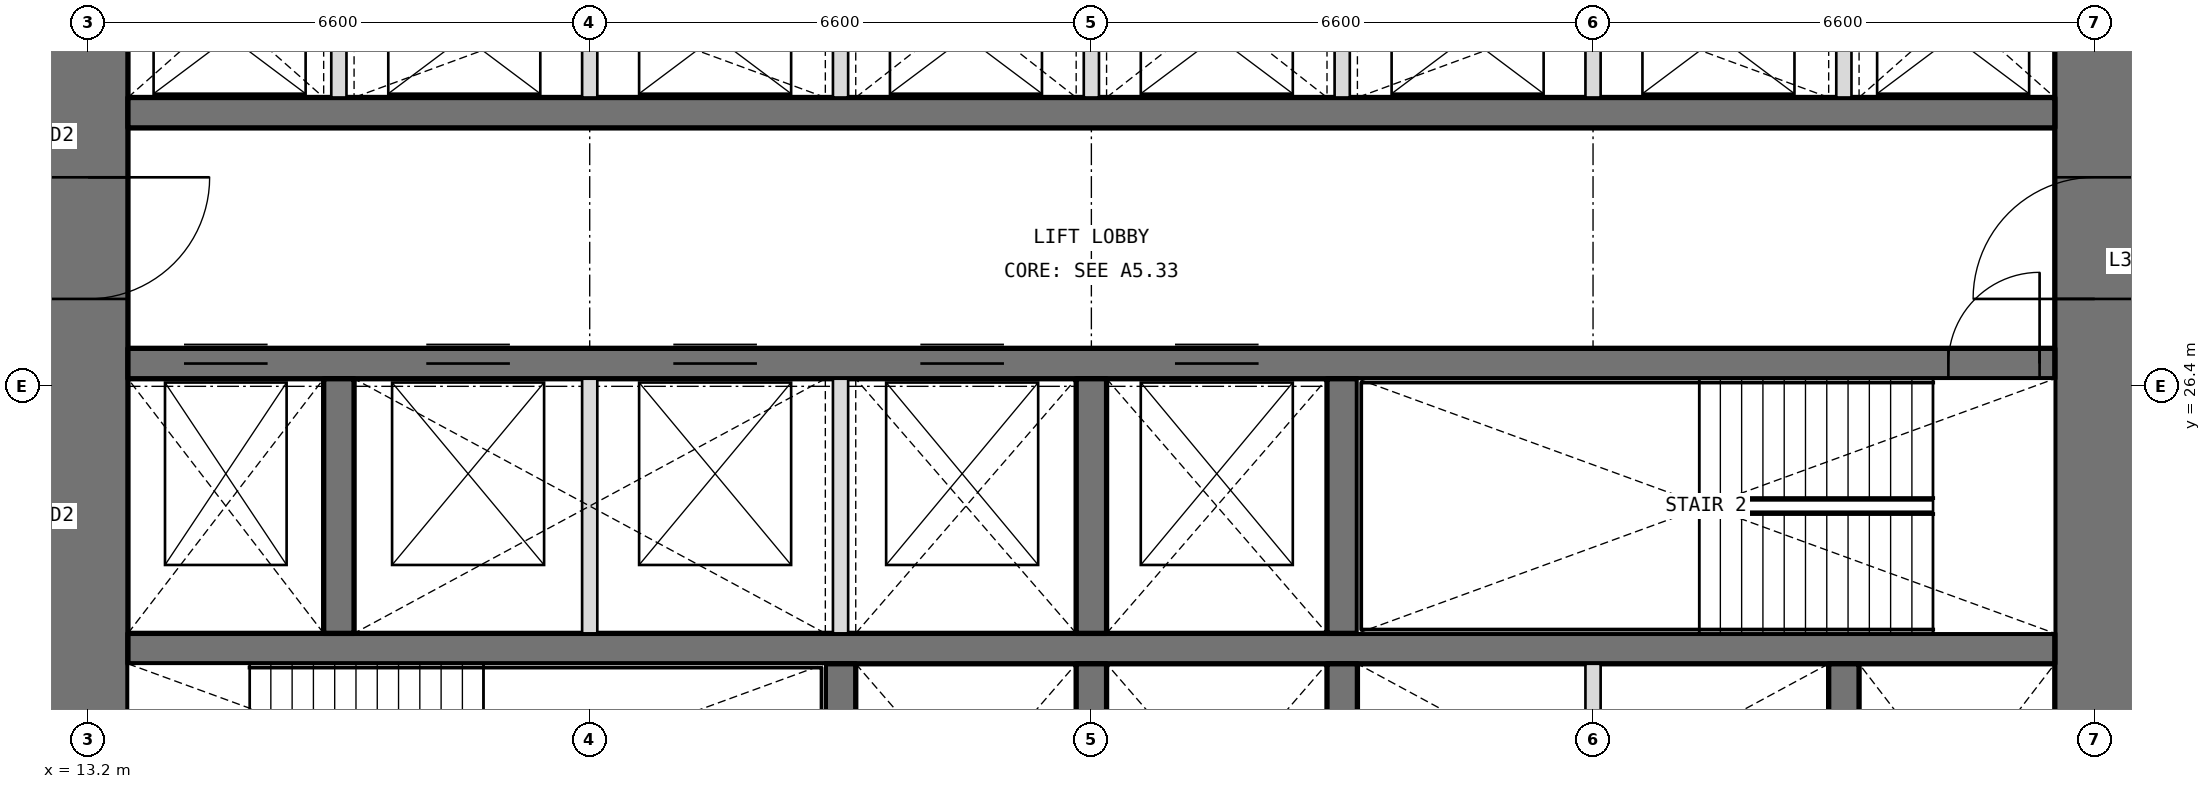
"""IFC4 building model, lengths in metres.
Left out: names, types, materials, properties, quantities, classifications, styles, units other than length and angle.
Written with IfcOpenShell. Run it as: python <this file> out.ifc"""

import sys

from ifc_helpers import new_model, si_unit, direction, frame, frame_2d, origin, place, context, subcontext, project, spatial, rectangle, extrude, element, fill, save


model = new_model("IFC4")
c1 = context("Model", 3, precision=1e-05, world=origin(), true_north=direction((0.0, 1.0)))
c2 = subcontext(c1, "Body", "Model", "MODEL_VIEW")
j1 = project(units=[si_unit("LENGTHUNIT", "METRE"), si_unit("PLANEANGLEUNIT", "RADIAN")], contexts=[c1])
p1 = place(None, origin())
s1 = spatial("IfcSite", under=j1, at=p1, CompositionType="ELEMENT")
p2 = place(p1, origin())
s2 = spatial("IfcBuilding", under=s1, at=p2, CompositionType="ELEMENT")
p3 = place(p2, frame((0.0, 0.0, 136.8)))
s3 = spatial("IfcBuildingStorey", under=s2, at=p3, CompositionType="ELEMENT", Elevation=136.8)
p4 = place(p3, frame((39.6, 13.725, 0.0), z_axis=(0.0, 0.0, 1.0), x_axis=(0.0, 1.0, 0.0)))
e1 = element("IfcWall", 1, at=p4, inside=s3, PredefinedType="SHEAR", context=c2, shape_type="SweptSolid", body=[
    extrude(rectangle(XDim=18.75, YDim=1.05, at=frame_2d((9.375, 0.0))), origin(), (0.0, 0.0, 1.0), 4.2),
])
p5 = place(p4, frame((3.025, 0.0, 0.0)))
e2 = element("IfcOpeningElement", 2, at=p5, cuts=e1, PredefinedType="OPENING", context=c2, shape_type="SweptSolid", body=[
    extrude(rectangle(XDim=1.6, YDim=2.1, at=frame_2d((0.8, 1.05))), frame((0.0, 0.535, 0.0), z_axis=(0.0, -1.0, 0.0), x_axis=(1.0, 0.0, 0.0)), (0.0, 0.0, 1.0), 1.07),
])
p6 = place(p4, frame((13.825, 0.0, 0.0)))
e3 = element("IfcOpeningElement", 3, at=p6, cuts=e1, PredefinedType="OPENING", context=c2, shape_type="SweptSolid", body=[
    extrude(rectangle(XDim=1.6, YDim=2.1, at=frame_2d((0.8, 1.05))), frame((0.0, 0.535, 0.0), z_axis=(0.0, -1.0, 0.0), x_axis=(1.0, 0.0, 0.0)), (0.0, 0.0, 1.0), 1.07),
])
p7 = place(p3, frame((13.2, 32.475, 0.0), z_axis=(0.0, 0.0, 1.0), x_axis=(0.0, -1.0, 0.0)))
e4 = element("IfcWall", 4, at=p7, inside=s3, PredefinedType="SHEAR", context=c2, shape_type="SweptSolid", body=[
    extrude(rectangle(XDim=18.75, YDim=1.05, at=frame_2d((9.375, 0.0))), origin(), (0.0, 0.0, 1.0), 4.2),
])
p8 = place(p7, frame((14.125, 0.0, 0.0)))
e5 = element("IfcOpeningElement", 5, at=p8, cuts=e4, PredefinedType="OPENING", context=c2, shape_type="SweptSolid", body=[
    extrude(rectangle(XDim=1.6, YDim=2.1, at=frame_2d((0.8, 1.05))), frame((0.0, 0.535, 0.0), z_axis=(0.0, -1.0, 0.0), x_axis=(1.0, 0.0, 0.0)), (0.0, 0.0, 1.0), 1.07),
])
p9 = place(p7, frame((3.325, 0.0, 0.0)))
e6 = element("IfcOpeningElement", 6, at=p9, cuts=e4, PredefinedType="OPENING", context=c2, shape_type="SweptSolid", body=[
    extrude(rectangle(XDim=1.6, YDim=2.1, at=frame_2d((0.8, 1.05))), frame((0.0, 0.535, 0.0), z_axis=(0.0, -1.0, 0.0), x_axis=(1.0, 0.0, 0.0)), (0.0, 0.0, 1.0), 1.07),
])
p10 = place(p3, frame((13.725, 22.95, 0.0), z_axis=(0.0, 0.0, 1.0), x_axis=(1.0, 0.0, 0.0)))
e7 = element("IfcWall", 7, at=p10, inside=s3, PredefinedType="SHEAR", context=c2, shape_type="SweptSolid", body=[
    extrude(rectangle(XDim=25.35, YDim=0.4, at=frame_2d((12.675, 0.0))), origin(), (0.0, 0.0, 1.0), 4.2),
])
p11 = place(p3, frame((13.725, 26.7, 0.0), z_axis=(0.0, 0.0, 1.0), x_axis=(1.0, 0.0, 0.0)))
e8 = element("IfcWall", 8, at=p11, inside=s3, PredefinedType="SHEAR", context=c2, shape_type="SweptSolid", body=[
    extrude(rectangle(XDim=25.35, YDim=0.4, at=frame_2d((12.675, 0.0))), origin(), (0.0, 0.0, 1.0), 4.2),
])
p12 = place(p11, frame((23.95, 0.0, 0.0)))
e9 = element("IfcOpeningElement", 9, at=p12, cuts=e8, PredefinedType="OPENING", context=c2, shape_type="SweptSolid", body=[
    extrude(rectangle(XDim=1.2, YDim=2.1, at=frame_2d((0.6, 1.05))), frame((0.0, 0.21, 0.0), z_axis=(0.0, -1.0, 0.0), x_axis=(1.0, 0.0, 0.0)), (0.0, 0.0, 1.0), 0.42),
])
p13 = place(p11, frame((0.738, 0.0, 0.0)))
e10 = element("IfcOpeningElement", 10, at=p13, cuts=e8, PredefinedType="OPENING", context=c2, shape_type="SweptSolid", body=[
    extrude(rectangle(XDim=1.1, YDim=2.1, at=frame_2d((0.55, 1.05))), frame((0.0, 0.21, 0.0), z_axis=(0.0, -1.0, 0.0), x_axis=(1.0, 0.0, 0.0)), (0.0, 0.0, 1.0), 0.42),
])
p14 = place(p11, frame((3.925, 0.0, 0.0)))
e11 = element("IfcOpeningElement", 11, at=p14, cuts=e8, PredefinedType="OPENING", context=c2, shape_type="SweptSolid", body=[
    extrude(rectangle(XDim=1.1, YDim=2.1, at=frame_2d((0.55, 1.05))), frame((0.0, 0.21, 0.0), z_axis=(0.0, -1.0, 0.0), x_axis=(1.0, 0.0, 0.0)), (0.0, 0.0, 1.0), 0.42),
])
p15 = place(p11, frame((7.175, 0.0, 0.0)))
e12 = element("IfcOpeningElement", 12, at=p15, cuts=e8, PredefinedType="OPENING", context=c2, shape_type="SweptSolid", body=[
    extrude(rectangle(XDim=1.1, YDim=2.1, at=frame_2d((0.55, 1.05))), frame((0.0, 0.21, 0.0), z_axis=(0.0, -1.0, 0.0), x_axis=(1.0, 0.0, 0.0)), (0.0, 0.0, 1.0), 0.42),
])
p16 = place(p11, frame((10.425, 0.0, 0.0)))
e13 = element("IfcOpeningElement", 13, at=p16, cuts=e8, PredefinedType="OPENING", context=c2, shape_type="SweptSolid", body=[
    extrude(rectangle(XDim=1.1, YDim=2.1, at=frame_2d((0.55, 1.05))), frame((0.0, 0.21, 0.0), z_axis=(0.0, -1.0, 0.0), x_axis=(1.0, 0.0, 0.0)), (0.0, 0.0, 1.0), 0.42),
])
p17 = place(p11, frame((13.775, 0.0, 0.0)))
e14 = element("IfcOpeningElement", 14, at=p17, cuts=e8, PredefinedType="OPENING", context=c2, shape_type="SweptSolid", body=[
    extrude(rectangle(XDim=1.1, YDim=2.1, at=frame_2d((0.55, 1.05))), frame((0.0, 0.21, 0.0), z_axis=(0.0, -1.0, 0.0), x_axis=(1.0, 0.0, 0.0)), (0.0, 0.0, 1.0), 0.42),
])
p18 = place(p3, frame((13.725, 30.0, 0.0), z_axis=(0.0, 0.0, 1.0), x_axis=(1.0, 0.0, 0.0)))
e15 = element("IfcWall", 15, at=p18, inside=s3, PredefinedType="SHEAR", context=c2, shape_type="SweptSolid", body=[
    extrude(rectangle(XDim=25.35, YDim=0.4, at=frame_2d((12.675, 0.0))), origin(), (0.0, 0.0, 1.0), 4.2),
])
for number, where, z_axis, x_axis in (
    (16, (23.1, 19.4, 0.0), (0.0, 0.0, 1.0), (0.0, 1.0, 0.0)),
    (17, (26.4, 19.4, 0.0), (0.0, 0.0, 1.0), (0.0, 1.0, 0.0)),
    (18, (29.7, 19.4, 0.0), (0.0, 0.0, 1.0), (0.0, 1.0, 0.0)),
    (19, (36.3, 19.4, 0.0), (0.0, 0.0, 1.0), (0.0, 1.0, 0.0)),
    (20, (16.5, 23.15, 0.0), (0.0, 0.0, 1.0), (0.0, 1.0, 0.0)),
    (21, (26.4, 23.15, 0.0), (0.0, 0.0, 1.0), (0.0, 1.0, 0.0)),
    (22, (29.7, 23.15, 0.0), (0.0, 0.0, 1.0), (0.0, 1.0, 0.0)),
):
    element("IfcWall", number, at=place(p3, frame(where, z_axis=z_axis, x_axis=x_axis)), inside=s3, PredefinedType="SHEAR", context=c2, shape_type="SweptSolid", body=[
        extrude(rectangle(XDim=3.35, YDim=0.4, at=frame_2d((1.675, 0.0))), origin(), (0.0, 0.0, 1.0), 4.2),
    ])
for number, where, z_axis, x_axis in (
    (23, (16.5, 30.2, 0.0), (0.0, 0.0, 1.0), (0.0, 1.0, 0.0)),
    (24, (19.8, 30.2, 0.0), (0.0, 0.0, 1.0), (0.0, 1.0, 0.0)),
    (25, (23.1, 30.2, 0.0), (0.0, 0.0, 1.0), (0.0, 1.0, 0.0)),
    (26, (26.4, 30.2, 0.0), (0.0, 0.0, 1.0), (0.0, 1.0, 0.0)),
    (27, (29.7, 30.2, 0.0), (0.0, 0.0, 1.0), (0.0, 1.0, 0.0)),
    (28, (33.0, 30.2, 0.0), (0.0, 0.0, 1.0), (0.0, 1.0, 0.0)),
    (29, (36.3, 30.2, 0.0), (0.0, 0.0, 1.0), (0.0, 1.0, 0.0)),
):
    element("IfcWall", number, at=place(p3, frame(where, z_axis=z_axis, x_axis=x_axis)), inside=s3, PredefinedType="PARTITIONING", context=c2, shape_type="SweptSolid", body=[
        extrude(rectangle(XDim=2.275, YDim=0.2, at=frame_2d((1.138, 0.0))), origin(), (0.0, 0.0, 1.0), 4.2),
    ])
for number, where, z_axis, x_axis in (
    (30, (33.0, 19.4, 0.0), (0.0, 0.0, 1.0), (0.0, 1.0, 0.0)),
    (31, (19.8, 23.15, 0.0), (0.0, 0.0, 1.0), (0.0, 1.0, 0.0)),
    (32, (23.1, 23.15, 0.0), (0.0, 0.0, 1.0), (0.0, 1.0, 0.0)),
):
    element("IfcWall", number, at=place(p3, frame(where, z_axis=z_axis, x_axis=x_axis)), inside=s3, PredefinedType="PARTITIONING", context=c2, shape_type="SweptSolid", body=[
        extrude(rectangle(XDim=3.35, YDim=0.2, at=frame_2d((1.675, 0.0))), origin(), (0.0, 0.0, 1.0), 4.2),
    ])
p19 = place(p12, origin())
e33 = element("IfcDoor", 33, at=p19, inside=s3, OperationType="SINGLE_SWING_RIGHT", PredefinedType="DOOR", context=c2, shape_type="SweptSolid", body=[
    extrude(rectangle(XDim=1.2, YDim=2.1, at=frame_2d((0.6, 1.05))), frame((0.0, 0.025, 0.0), z_axis=(0.0, -1.0, 0.0), x_axis=(1.0, 0.0, 0.0)), (0.0, 0.0, 1.0), 0.05),
])
fill(e9, e33)
p20 = place(p9, origin())
e34 = element("IfcDoor", 34, at=p20, inside=s3, OperationType="DOUBLE_DOOR_DOUBLE_SWING", PredefinedType="DOOR", context=c2, shape_type="SweptSolid", body=[
    extrude(rectangle(XDim=1.6, YDim=2.1, at=frame_2d((0.8, 1.05))), frame((0.0, 0.025, 0.0), z_axis=(0.0, -1.0, 0.0), x_axis=(1.0, 0.0, 0.0)), (0.0, 0.0, 1.0), 0.05),
])
fill(e6, e34)
p21 = place(p6, origin())
e35 = element("IfcDoor", 35, at=p21, inside=s3, OperationType="DOUBLE_DOOR_DOUBLE_SWING", PredefinedType="DOOR", context=c2, shape_type="SweptSolid", body=[
    extrude(rectangle(XDim=1.6, YDim=2.1, at=frame_2d((0.8, 1.05))), frame((0.0, 0.025, 0.0), z_axis=(0.0, -1.0, 0.0), x_axis=(1.0, 0.0, 0.0)), (0.0, 0.0, 1.0), 0.05),
])
fill(e3, e35)
p22 = place(p13, origin())
e36 = element("IfcDoor", 36, at=p22, inside=s3, OperationType="DOUBLE_DOOR_SLIDING", PredefinedType="DOOR", context=c2, shape_type="SweptSolid", body=[
    extrude(rectangle(XDim=1.1, YDim=2.1, at=frame_2d((0.55, 1.05))), frame((0.0, 0.025, 0.0), z_axis=(0.0, -1.0, 0.0), x_axis=(1.0, 0.0, 0.0)), (0.0, 0.0, 1.0), 0.05),
])
fill(e10, e36)
p23 = place(p14, origin())
e37 = element("IfcDoor", 37, at=p23, inside=s3, OperationType="DOUBLE_DOOR_SLIDING", PredefinedType="DOOR", context=c2, shape_type="SweptSolid", body=[
    extrude(rectangle(XDim=1.1, YDim=2.1, at=frame_2d((0.55, 1.05))), frame((0.0, 0.025, 0.0), z_axis=(0.0, -1.0, 0.0), x_axis=(1.0, 0.0, 0.0)), (0.0, 0.0, 1.0), 0.05),
])
fill(e11, e37)
p24 = place(p15, origin())
e38 = element("IfcDoor", 38, at=p24, inside=s3, OperationType="DOUBLE_DOOR_SLIDING", PredefinedType="DOOR", context=c2, shape_type="SweptSolid", body=[
    extrude(rectangle(XDim=1.1, YDim=2.1, at=frame_2d((0.55, 1.05))), frame((0.0, 0.025, 0.0), z_axis=(0.0, -1.0, 0.0), x_axis=(1.0, 0.0, 0.0)), (0.0, 0.0, 1.0), 0.05),
])
fill(e12, e38)
p25 = place(p16, origin())
e39 = element("IfcDoor", 39, at=p25, inside=s3, OperationType="DOUBLE_DOOR_SLIDING", PredefinedType="DOOR", context=c2, shape_type="SweptSolid", body=[
    extrude(rectangle(XDim=1.1, YDim=2.1, at=frame_2d((0.55, 1.05))), frame((0.0, 0.025, 0.0), z_axis=(0.0, -1.0, 0.0), x_axis=(1.0, 0.0, 0.0)), (0.0, 0.0, 1.0), 0.05),
])
fill(e13, e39)
p26 = place(p17, origin())
e40 = element("IfcDoor", 40, at=p26, inside=s3, OperationType="DOUBLE_DOOR_SLIDING", PredefinedType="DOOR", context=c2, shape_type="SweptSolid", body=[
    extrude(rectangle(XDim=1.1, YDim=2.1, at=frame_2d((0.55, 1.05))), frame((0.0, 0.025, 0.0), z_axis=(0.0, -1.0, 0.0), x_axis=(1.0, 0.0, 0.0)), (0.0, 0.0, 1.0), 0.05),
])
fill(e14, e40)
save(model, sys.argv[1])
